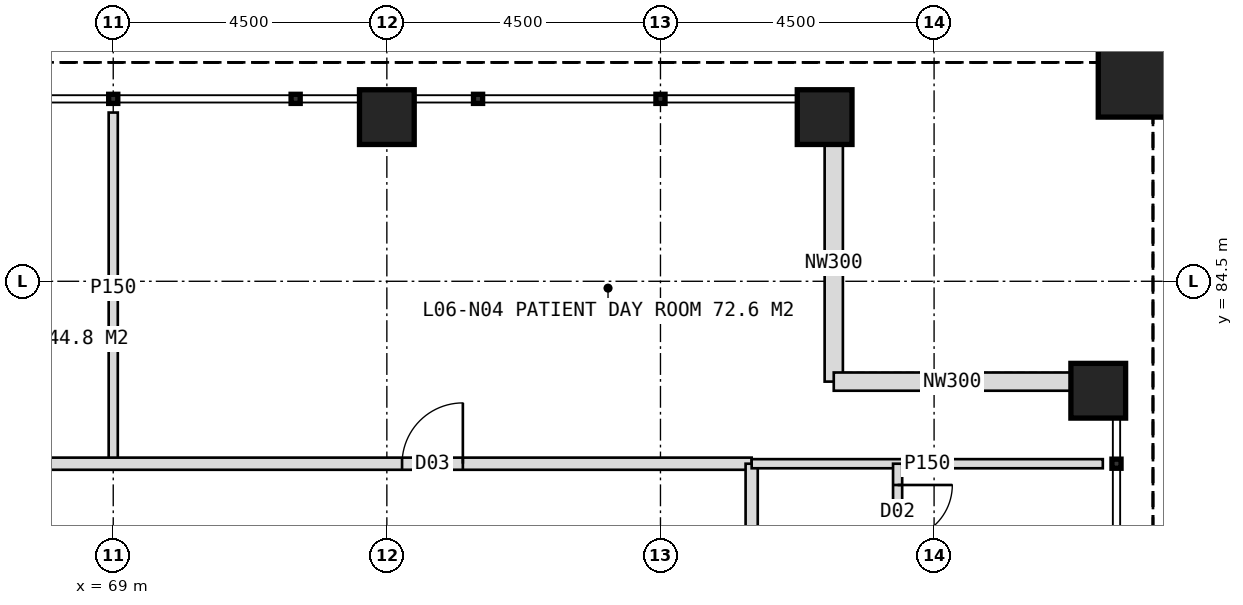
"""IFC4 building model, lengths in metres.
Left out: names, types, materials, properties, quantities, classifications, styles, units other than length and angle.
Written with IfcOpenShell. Run it as: python <this file> out.ifc"""

import sys

from ifc_helpers import new_model, si_unit, direction, frame, frame_2d, origin, origin_2d, place, context, subcontext, project, spatial, rectangle, hollow_rectangle, extrude, element, fill, save


model = new_model("IFC4")
c1 = context("Model", 3, precision=1e-05, world=origin(), true_north=direction((0.0, 1.0)))
c2 = subcontext(c1, "Body", "Model", "MODEL_VIEW")
j1 = project(units=[si_unit("LENGTHUNIT", "METRE"), si_unit("PLANEANGLEUNIT", "RADIAN")], contexts=[c1])
p1 = place(None, origin())
s1 = spatial("IfcSite", under=j1, at=p1, CompositionType="ELEMENT")
p2 = place(p1, origin())
s2 = spatial("IfcBuilding", under=s1, at=p2, CompositionType="ELEMENT")
p3 = place(p2, frame((0.0, 0.0, 31.0)))
s3 = spatial("IfcBuildingStorey", under=s2, at=p3, CompositionType="ELEMENT", Elevation=31.0)
for number, where, z_axis, x_axis in (
    (1, (73.5, 87.2, 0.0), (0.0, 0.0, 1.0), (1.0, 0.0, 0.0)),
    (2, (80.7, 87.2, 0.0), (0.0, 0.0, 1.0), (1.0, 0.0, 0.0)),
    (3, (85.2, 82.7, 0.0), (0.0, 0.0, 1.0), (1.0, 0.0, 0.0)),
):
    element("IfcColumn", number, at=place(p3, frame(where, z_axis=z_axis, x_axis=x_axis)), inside=s3, PredefinedType="COLUMN", context=c2, shape_type="SweptSolid", body=[
        extrude(hollow_rectangle(XDim=0.9, YDim=0.9, WallThickness=0.08, at=origin_2d()), origin(), (0.0, 0.0, 1.0), 4.0),
    ])
p4 = place(p3, frame((86.1, 88.1, 0.0), z_axis=(0.0, 0.0, 1.0), x_axis=(1.0, 0.0, 0.0)))
e4 = element("IfcColumn", 4, at=p4, inside=s3, PredefinedType="COLUMN", context=c2, shape_type="SweptSolid", body=[
    extrude(hollow_rectangle(XDim=1.8, YDim=1.8, WallThickness=0.1, at=origin_2d()), origin(), (0.0, 0.0, 1.0), 4.0),
])
for number, where, z_axis, x_axis in (
    (5, (80.85, 86.75, 0.0), (0.0, 0.0, 1.0), (0.0, -1.0, 0.0)),
    (6, (80.85, 82.85, 0.0), (0.0, 0.0, 1.0), (1.0, 0.0, 0.0)),
):
    element("IfcWall", number, at=place(p3, frame(where, z_axis=z_axis, x_axis=x_axis)), inside=s3, PredefinedType="ELEMENTEDWALL", context=c2, shape_type="SweptSolid", body=[
        extrude(rectangle(XDim=3.9, YDim=0.3, at=frame_2d((1.95, 0.0))), origin(), (0.0, 0.0, 1.0), 2.95),
    ])
p5 = place(p3, frame((69.0, 81.5, 0.0), z_axis=(0.0, 0.0, 1.0), x_axis=(0.0, 1.0, 0.0)))
e7 = element("IfcWall", 7, at=p5, inside=s3, PredefinedType="PARTITIONING", context=c2, shape_type="SweptSolid", body=[
    extrude(rectangle(XDim=5.775, YDim=0.15, at=frame_2d((2.887, 0.0))), origin(), (0.0, 0.0, 1.0), 3.75),
])
p6 = place(p3, frame((40.5, 81.5, 0.0), z_axis=(0.0, 0.0, 1.0), x_axis=(1.0, 0.0, 0.0)))
e8 = element("IfcWall", 8, at=p6, inside=s3, PredefinedType="PARTITIONING", context=c2, shape_type="SweptSolid", body=[
    extrude(rectangle(XDim=39.0, YDim=0.2, at=frame_2d((19.5, 0.0))), origin(), (0.0, 0.0, 1.0), 3.75),
])
p7 = place(p6, frame((3.25, 0.0, 0.0)))
e9 = element("IfcOpeningElement", 9, at=p7, cuts=e8, PredefinedType="OPENING", context=c2, shape_type="SweptSolid", body=[
    extrude(rectangle(XDim=1.2, YDim=2.2, at=frame_2d((0.6, 1.1))), frame((0.0, 0.11, 0.0), z_axis=(0.0, -1.0, 0.0), x_axis=(1.0, 0.0, 0.0)), (0.0, 0.0, 1.0), 0.22),
])
p8 = place(p6, frame((13.75, 0.0, 0.0)))
e10 = element("IfcOpeningElement", 10, at=p8, cuts=e8, PredefinedType="OPENING", context=c2, shape_type="SweptSolid", body=[
    extrude(rectangle(XDim=1.2, YDim=2.2, at=frame_2d((0.6, 1.1))), frame((0.0, 0.11, 0.0), z_axis=(0.0, -1.0, 0.0), x_axis=(1.0, 0.0, 0.0)), (0.0, 0.0, 1.0), 0.22),
])
p9 = place(p6, frame((22.75, 0.0, 0.0)))
e11 = element("IfcOpeningElement", 11, at=p9, cuts=e8, PredefinedType="OPENING", context=c2, shape_type="SweptSolid", body=[
    extrude(rectangle(XDim=1.2, YDim=2.2, at=frame_2d((0.6, 1.1))), frame((0.0, 0.11, 0.0), z_axis=(0.0, -1.0, 0.0), x_axis=(1.0, 0.0, 0.0)), (0.0, 0.0, 1.0), 0.22),
])
p10 = place(p6, frame((33.25, 0.0, 0.0)))
e12 = element("IfcOpeningElement", 12, at=p10, cuts=e8, PredefinedType="OPENING", context=c2, shape_type="SweptSolid", body=[
    extrude(rectangle(XDim=1.0, YDim=2.1, at=frame_2d((0.5, 1.05))), frame((0.0, 0.11, 0.0), z_axis=(0.0, -1.0, 0.0), x_axis=(1.0, 0.0, 0.0)), (0.0, 0.0, 1.0), 0.22),
])
p11 = place(p3, frame((79.5, 81.5, 0.0), z_axis=(0.0, 0.0, 1.0), x_axis=(0.0, -1.0, 0.0)))
e13 = element("IfcWall", 13, at=p11, inside=s3, PredefinedType="PARTITIONING", context=c2, shape_type="SweptSolid", body=[
    extrude(rectangle(XDim=39.0, YDim=0.2, at=frame_2d((19.5, 0.0))), origin(), (0.0, 0.0, 1.0), 3.75),
])
p12 = place(p11, frame((3.25, 0.0, 0.0)))
e14 = element("IfcOpeningElement", 14, at=p12, cuts=e13, PredefinedType="OPENING", context=c2, shape_type="SweptSolid", body=[
    extrude(rectangle(XDim=1.2, YDim=2.2, at=frame_2d((0.6, 1.1))), frame((0.0, 0.11, 0.0), z_axis=(0.0, -1.0, 0.0), x_axis=(1.0, 0.0, 0.0)), (0.0, 0.0, 1.0), 0.22),
])
p13 = place(p11, frame((10.15, 0.0, 0.0)))
e15 = element("IfcOpeningElement", 15, at=p13, cuts=e13, PredefinedType="OPENING", context=c2, shape_type="SweptSolid", body=[
    extrude(rectangle(XDim=1.2, YDim=2.2, at=frame_2d((0.6, 1.1))), frame((0.0, 0.11, 0.0), z_axis=(0.0, -1.0, 0.0), x_axis=(1.0, 0.0, 0.0)), (0.0, 0.0, 1.0), 0.22),
])
p14 = place(p11, frame((16.15, 0.0, 0.0)))
e16 = element("IfcOpeningElement", 16, at=p14, cuts=e13, PredefinedType="OPENING", context=c2, shape_type="SweptSolid", body=[
    extrude(rectangle(XDim=1.2, YDim=2.2, at=frame_2d((0.6, 1.1))), frame((0.0, 0.11, 0.0), z_axis=(0.0, -1.0, 0.0), x_axis=(1.0, 0.0, 0.0)), (0.0, 0.0, 1.0), 0.22),
])
p15 = place(p11, frame((22.75, 0.0, 0.0)))
e17 = element("IfcOpeningElement", 17, at=p15, cuts=e13, PredefinedType="OPENING", context=c2, shape_type="SweptSolid", body=[
    extrude(rectangle(XDim=1.2, YDim=2.2, at=frame_2d((0.6, 1.1))), frame((0.0, 0.11, 0.0), z_axis=(0.0, -1.0, 0.0), x_axis=(1.0, 0.0, 0.0)), (0.0, 0.0, 1.0), 0.22),
])
p16 = place(p11, frame((31.15, 0.0, 0.0)))
e18 = element("IfcOpeningElement", 18, at=p16, cuts=e13, PredefinedType="OPENING", context=c2, shape_type="SweptSolid", body=[
    extrude(rectangle(XDim=1.2, YDim=2.2, at=frame_2d((0.6, 1.1))), frame((0.0, 0.11, 0.0), z_axis=(0.0, -1.0, 0.0), x_axis=(1.0, 0.0, 0.0)), (0.0, 0.0, 1.0), 0.22),
])
p17 = place(p3, frame((79.5, 81.5, 0.0), z_axis=(0.0, 0.0, 1.0), x_axis=(1.0, 0.0, 0.0)))
e19 = element("IfcWall", 19, at=p17, inside=s3, PredefinedType="PARTITIONING", context=c2, shape_type="SweptSolid", body=[
    extrude(rectangle(XDim=5.775, YDim=0.15, at=frame_2d((2.887, 0.0))), origin(), (0.0, 0.0, 1.0), 3.75),
])
p18 = place(p3, frame((81.9, 81.5, 0.0), z_axis=(0.0, 0.0, 1.0), x_axis=(0.0, -1.0, 0.0)))
e20 = element("IfcWall", 20, at=p18, inside=s3, PredefinedType="PARTITIONING", context=c2, shape_type="SweptSolid", body=[
    extrude(rectangle(XDim=3.0, YDim=0.15, at=frame_2d((1.5, 0.0))), origin(), (0.0, 0.0, 1.0), 3.75),
])
p19 = place(p18, frame((0.35, 0.0, 0.0)))
e21 = element("IfcOpeningElement", 21, at=p19, cuts=e20, PredefinedType="OPENING", context=c2, shape_type="SweptSolid", body=[
    extrude(rectangle(XDim=0.9, YDim=2.1, at=frame_2d((0.45, 1.05))), frame((0.0, 0.085, 0.0), z_axis=(0.0, -1.0, 0.0), x_axis=(1.0, 0.0, 0.0)), (0.0, 0.0, 1.0), 0.17),
])
p20 = place(p10, origin())
e22 = element("IfcDoor", 22, at=p20, inside=s3, OperationType="SINGLE_SWING_RIGHT", PredefinedType="DOOR", context=c2, shape_type="SweptSolid", body=[
    extrude(rectangle(XDim=1.0, YDim=2.1, at=frame_2d((0.5, 1.05))), frame((0.0, 0.025, 0.0), z_axis=(0.0, -1.0, 0.0), x_axis=(1.0, 0.0, 0.0)), (0.0, 0.0, 1.0), 0.05),
])
fill(e12, e22)
p21 = place(p19, origin())
e23 = element("IfcDoor", 23, at=p21, inside=s3, OperationType="SINGLE_SWING_LEFT", PredefinedType="DOOR", context=c2, shape_type="SweptSolid", body=[
    extrude(rectangle(XDim=0.9, YDim=2.1, at=frame_2d((0.45, 1.05))), frame((0.0, 0.025, 0.0), z_axis=(0.0, -1.0, 0.0), x_axis=(1.0, 0.0, 0.0)), (0.0, 0.0, 1.0), 0.05),
])
fill(e21, e23)
save(model, sys.argv[1])
